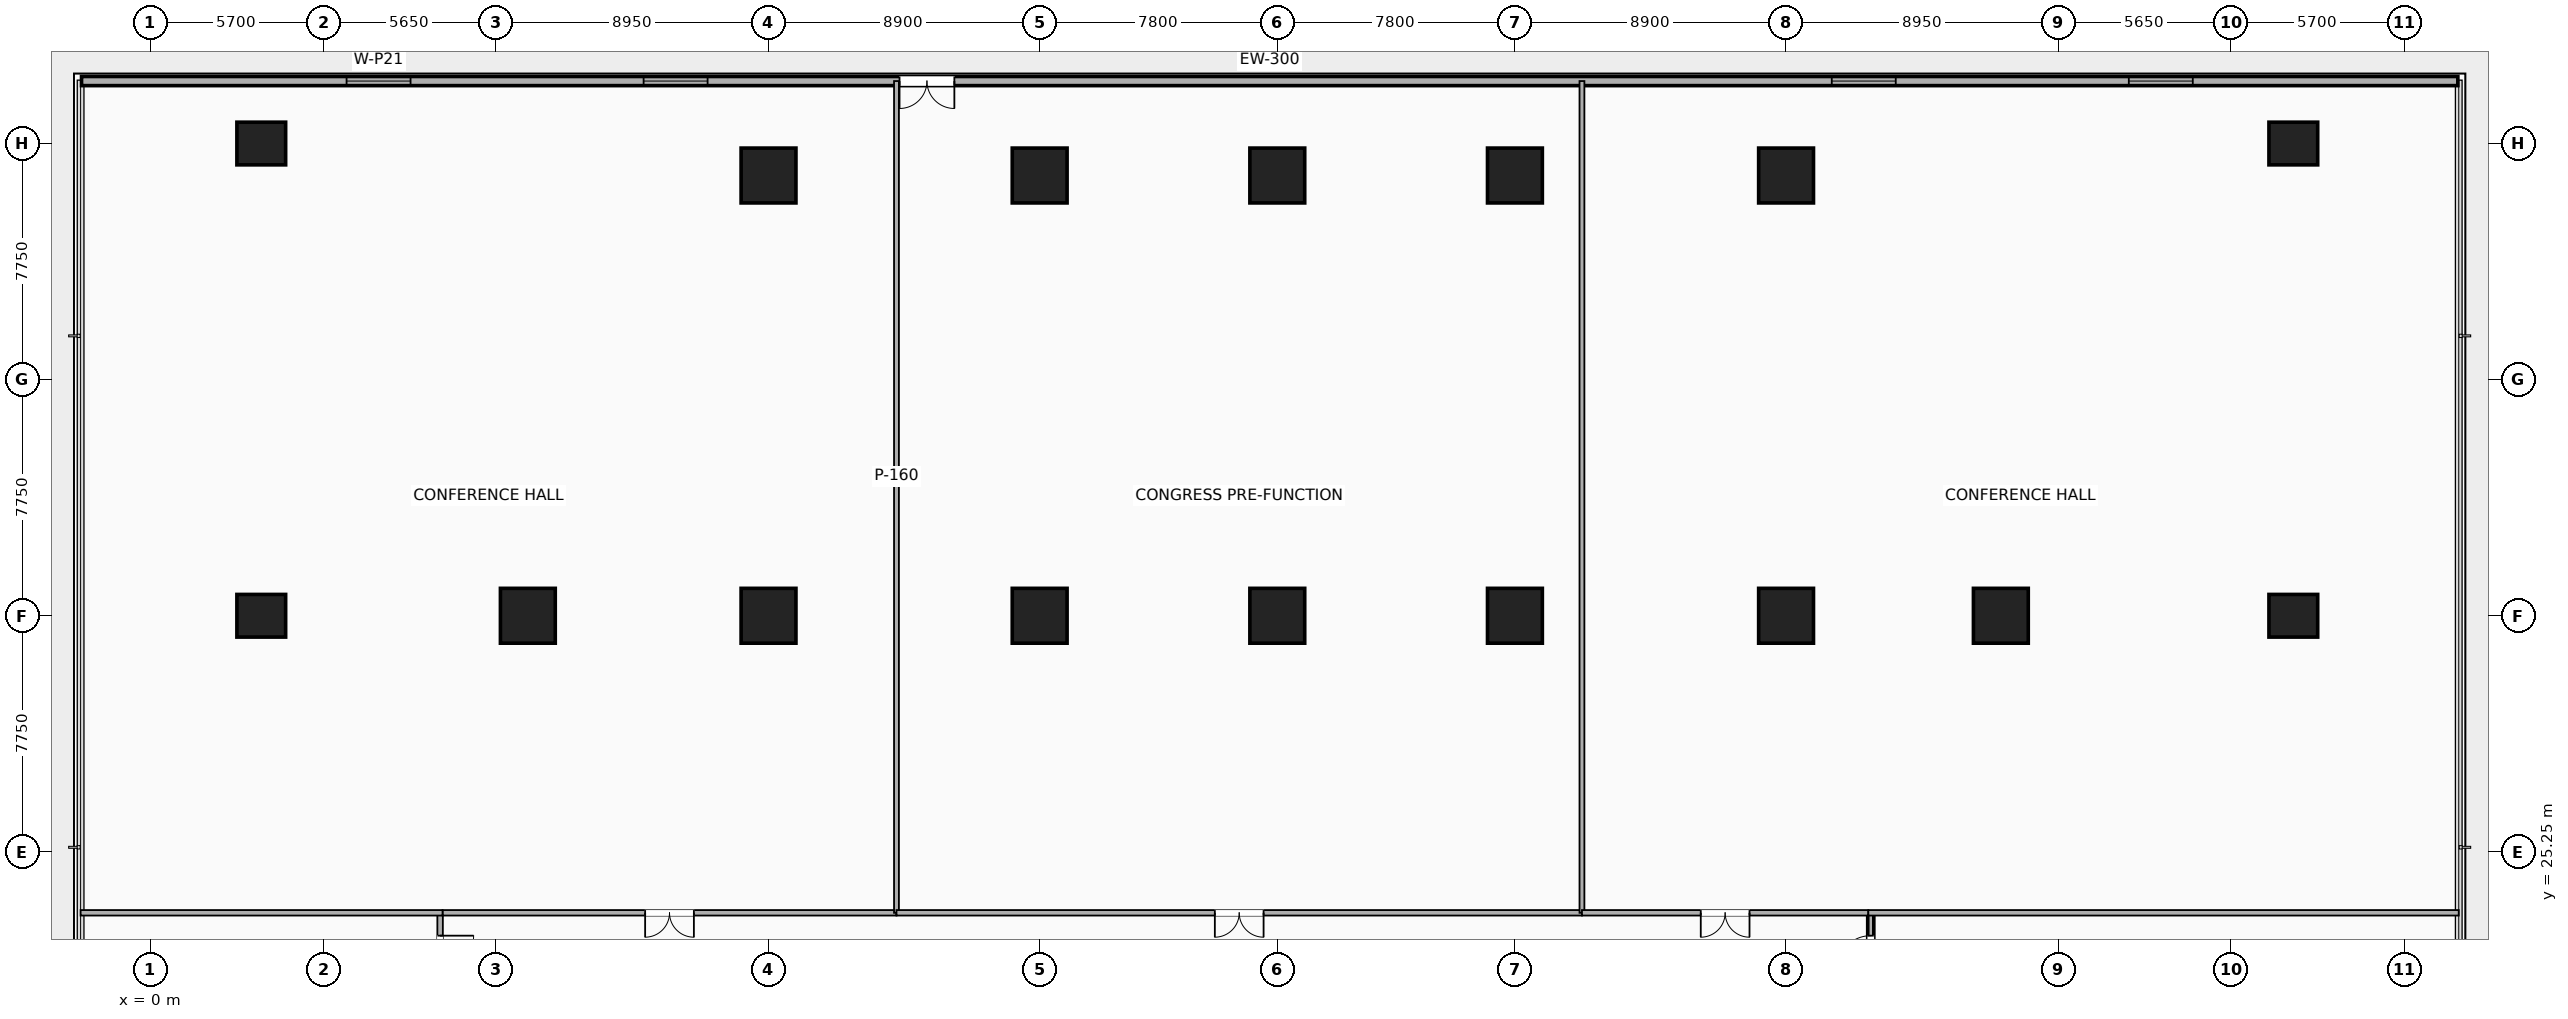
"""IFC4 building model, lengths in metres.
Left out: names, types, materials, properties, quantities, classifications, styles, units other than length and angle.
Written with IfcOpenShell. Run it as: python <this file> out.ifc"""

import sys

from ifc_helpers import new_model, si_unit, direction, frame, frame_2d, origin, origin_2d, place, context, subcontext, project, spatial, rectangle, extrude, element, fill, save


model = new_model("IFC4")
c1 = context("Model", 3, precision=1e-05, world=origin(), true_north=direction((0.0, 1.0)))
c2 = subcontext(c1, "Body", "Model", "MODEL_VIEW")
j1 = project(units=[si_unit("LENGTHUNIT", "METRE"), si_unit("PLANEANGLEUNIT", "RADIAN")], contexts=[c1])
p1 = place(None, origin())
s1 = spatial("IfcSite", under=j1, at=p1, CompositionType="ELEMENT")
p2 = place(p1, origin())
s2 = spatial("IfcBuilding", under=s1, at=p2, CompositionType="ELEMENT")
p3 = place(p2, frame((0.0, 0.0, 5.4)))
s3 = spatial("IfcBuildingStorey", under=s2, at=p3, CompositionType="ELEMENT", Elevation=5.4)
for number, where, z_axis, x_axis in (
    (1, (20.3, 33.0, -0.3), (0.0, 0.0, 1.0), (1.0, 0.0, 0.0)),
    (2, (29.2, 33.0, -0.3), (0.0, 0.0, 1.0), (1.0, 0.0, 0.0)),
    (3, (37.0, 33.0, -0.3), (0.0, 0.0, 1.0), (1.0, 0.0, 0.0)),
    (4, (44.8, 33.0, -0.3), (0.0, 0.0, 1.0), (1.0, 0.0, 0.0)),
    (5, (12.4, 33.0, -0.3), (0.0, 0.0, 1.0), (1.0, 0.0, 0.0)),
    (6, (20.3, 47.45, -0.3), (0.0, 0.0, 1.0), (1.0, 0.0, 0.0)),
    (7, (29.2, 47.45, -0.3), (0.0, 0.0, 1.0), (1.0, 0.0, 0.0)),
    (8, (37.0, 47.45, -0.3), (0.0, 0.0, 1.0), (1.0, 0.0, 0.0)),
    (9, (44.8, 47.45, -0.3), (0.0, 0.0, 1.0), (1.0, 0.0, 0.0)),
    (10, (53.7, 47.45, -0.3), (0.0, 0.0, 1.0), (1.0, 0.0, 0.0)),
    (11, (60.75, 33.0, -0.3), (0.0, 0.0, 1.0), (1.0, 0.0, 0.0)),
    (12, (53.7, 33.0, -0.3), (0.0, 0.0, 1.0), (1.0, 0.0, 0.0)),
):
    element("IfcColumn", number, at=place(p3, frame(where, z_axis=z_axis, x_axis=x_axis)), inside=s3, PredefinedType="COLUMN", context=c2, shape_type="SweptSolid", body=[
        extrude(rectangle(XDim=1.8, YDim=1.8, at=origin_2d()), origin(), (0.0, 0.0, 1.0), 4.6),
    ])
for number, where, z_axis, x_axis in (
    (13, (3.65, 33.0, -0.3), (0.0, 0.0, 1.0), (1.0, 0.0, 0.0)),
    (14, (3.65, 48.5, -0.3), (0.0, 0.0, 1.0), (1.0, 0.0, 0.0)),
    (15, (70.35, 33.0, -0.3), (0.0, 0.0, 1.0), (1.0, 0.0, 0.0)),
    (16, (70.35, 48.5, -0.3), (0.0, 0.0, 1.0), (1.0, 0.0, 0.0)),
):
    element("IfcColumn", number, at=place(p3, frame(where, z_axis=z_axis, x_axis=x_axis)), inside=s3, PredefinedType="COLUMN", context=c2, shape_type="SweptSolid", body=[
        extrude(rectangle(XDim=1.6, YDim=1.4, at=origin_2d()), origin(), (0.0, 0.0, 1.0), 4.6),
    ])
p4 = place(p3, frame((-2.25, 50.55, 0.0), z_axis=(0.0, 0.0, 1.0), x_axis=(1.0, 0.0, 0.0)))
e17 = element("IfcWall", 17, at=p4, inside=s3, PredefinedType="SOLIDWALL", context=c2, shape_type="SweptSolid", body=[
    extrude(rectangle(XDim=78.0, YDim=0.3, at=frame_2d((39.0, 0.0))), origin(), (0.0, 0.0, 1.0), 4.3),
])
p5 = place(p4, frame((26.85, 0.0, 0.0)))
e18 = element("IfcOpeningElement", 18, at=p5, cuts=e17, PredefinedType="OPENING", context=c2, shape_type="SweptSolid", body=[
    extrude(rectangle(XDim=1.8, YDim=2.15, at=frame_2d((0.9, 1.075))), frame((0.0, 0.16, 0.0), z_axis=(0.0, -1.0, 0.0), x_axis=(1.0, 0.0, 0.0)), (0.0, 0.0, 1.0), 0.32),
])
p6 = place(p4, frame((8.7, 0.0, 0.85)))
e19 = element("IfcOpeningElement", 19, at=p6, cuts=e17, PredefinedType="OPENING", context=c2, shape_type="SweptSolid", body=[
    extrude(rectangle(XDim=2.1, YDim=2.15, at=frame_2d((1.05, 1.075))), frame((0.0, 0.16, 0.0), z_axis=(0.0, -1.0, 0.0), x_axis=(1.0, 0.0, 0.0)), (0.0, 0.0, 1.0), 0.32),
])
p7 = place(p4, frame((18.45, 0.0, 0.85)))
e20 = element("IfcOpeningElement", 20, at=p7, cuts=e17, PredefinedType="OPENING", context=c2, shape_type="SweptSolid", body=[
    extrude(rectangle(XDim=2.1, YDim=2.15, at=frame_2d((1.05, 1.075))), frame((0.0, 0.16, 0.0), z_axis=(0.0, -1.0, 0.0), x_axis=(1.0, 0.0, 0.0)), (0.0, 0.0, 1.0), 0.32),
])
p8 = place(p4, frame((57.45, 0.0, 0.85)))
e21 = element("IfcOpeningElement", 21, at=p8, cuts=e17, PredefinedType="OPENING", context=c2, shape_type="SweptSolid", body=[
    extrude(rectangle(XDim=2.1, YDim=2.15, at=frame_2d((1.05, 1.075))), frame((0.0, 0.16, 0.0), z_axis=(0.0, -1.0, 0.0), x_axis=(1.0, 0.0, 0.0)), (0.0, 0.0, 1.0), 0.32),
])
p9 = place(p4, frame((67.2, 0.0, 0.85)))
e22 = element("IfcOpeningElement", 22, at=p9, cuts=e17, PredefinedType="OPENING", context=c2, shape_type="SweptSolid", body=[
    extrude(rectangle(XDim=2.1, YDim=2.15, at=frame_2d((1.05, 1.075))), frame((0.0, 0.16, 0.0), z_axis=(0.0, -1.0, 0.0), x_axis=(1.0, 0.0, 0.0)), (0.0, 0.0, 1.0), 0.32),
])
p10 = place(p3, frame((9.52, 0.22, 0.0), z_axis=(0.0, 0.0, 1.0), x_axis=(0.0, 1.0, 0.0)))
e23 = element("IfcWall", 23, at=p10, inside=s3, PredefinedType="PARTITIONING", context=c2, shape_type="SweptSolid", body=[
    extrude(rectangle(XDim=23.03, YDim=0.18, at=frame_2d((11.515, 0.0))), origin(), (0.0, 0.0, 1.0), 4.3),
])
p11 = place(p10, frame((21.18, 0.0, 0.0)))
e24 = element("IfcOpeningElement", 24, at=p11, cuts=e23, PredefinedType="OPENING", context=c2, shape_type="SweptSolid", body=[
    extrude(rectangle(XDim=1.1, YDim=2.15, at=frame_2d((0.55, 1.075))), frame((0.0, 0.1, 0.0), z_axis=(0.0, -1.0, 0.0), x_axis=(1.0, 0.0, 0.0)), (0.0, 0.0, 1.0), 0.2),
])
p12 = place(p3, frame((56.48, 0.22, 0.0), z_axis=(0.0, 0.0, 1.0), x_axis=(0.0, 1.0, 0.0)))
e25 = element("IfcWall", 25, at=p12, inside=s3, PredefinedType="PARTITIONING", context=c2, shape_type="SweptSolid", body=[
    extrude(rectangle(XDim=23.03, YDim=0.2, at=frame_2d((11.515, 0.0))), origin(), (0.0, 0.0, 1.0), 3.373),
])
p13 = place(p12, frame((22.28, 0.0, 0.0), z_axis=(0.0, 0.0, 1.0), x_axis=(-1.0, 0.0, 0.0)))
e26 = element("IfcOpeningElement", 26, at=p13, cuts=e25, PredefinedType="OPENING", context=c2, shape_type="SweptSolid", body=[
    extrude(rectangle(XDim=1.1, YDim=2.15, at=frame_2d((0.55, 1.075))), frame((0.0, 0.11, 0.0), z_axis=(0.0, -1.0, 0.0), x_axis=(1.0, 0.0, 0.0)), (0.0, 0.0, 1.0), 0.22),
])
p14 = place(p3, frame((9.6, 23.25, 0.0), z_axis=(0.0, 0.0, 1.0), x_axis=(1.0, 0.0, 0.0)))
e27 = element("IfcWall", 27, at=p14, inside=s3, PredefinedType="PARTITIONING", context=c2, shape_type="SweptSolid", body=[
    extrude(rectangle(XDim=14.9, YDim=0.18, at=frame_2d((7.45, 0.0))), origin(), (0.0, 0.0, 1.0), 3.43),
])
p15 = place(p14, frame((6.65, 0.0, 0.0)))
e28 = element("IfcOpeningElement", 28, at=p15, cuts=e27, PredefinedType="OPENING", context=c2, shape_type="SweptSolid", body=[
    extrude(rectangle(XDim=1.6, YDim=2.22, at=frame_2d((0.8, 1.11))), frame((0.0, 0.1, 0.0), z_axis=(0.0, -1.0, 0.0), x_axis=(1.0, 0.0, 0.0)), (0.0, 0.0, 1.0), 0.2),
])
p16 = place(p3, frame((-2.28, 23.25, 0.0), z_axis=(0.0, 0.0, 1.0), x_axis=(1.0, 0.0, 0.0)))
e29 = element("IfcWall", 29, at=p16, inside=s3, PredefinedType="PARTITIONING", context=c2, shape_type="SweptSolid", body=[
    extrude(rectangle(XDim=11.88, YDim=0.18, at=frame_2d((5.94, 0.0))), origin(), (0.0, 0.0, 1.0), 3.43),
])
p17 = place(p3, frame((24.5, 23.25, 0.0), z_axis=(0.0, 0.0, 1.0), x_axis=(0.0, 1.0, 0.0)))
e30 = element("IfcWall", 30, at=p17, inside=s3, PredefinedType="PARTITIONING", context=c2, shape_type="SweptSolid", body=[
    extrude(rectangle(XDim=27.3, YDim=0.16, at=frame_2d((13.65, 0.0))), origin(), (0.0, 0.0, 1.0), 3.373),
])
p18 = place(p3, frame((24.5, 23.25, 0.0), z_axis=(0.0, 0.0, 1.0), x_axis=(1.0, 0.0, 0.0)))
e31 = element("IfcWall", 31, at=p18, inside=s3, PredefinedType="PARTITIONING", context=c2, shape_type="SweptSolid", body=[
    extrude(rectangle(XDim=22.5, YDim=0.18, at=frame_2d((11.25, 0.0))), origin(), (0.0, 0.0, 1.0), 3.43),
])
p19 = place(p18, frame((10.45, 0.0, 0.0)))
e32 = element("IfcOpeningElement", 32, at=p19, cuts=e31, PredefinedType="OPENING", context=c2, shape_type="SweptSolid", body=[
    extrude(rectangle(XDim=1.6, YDim=2.22, at=frame_2d((0.8, 1.11))), frame((0.0, 0.1, 0.0), z_axis=(0.0, -1.0, 0.0), x_axis=(1.0, 0.0, 0.0)), (0.0, 0.0, 1.0), 0.2),
])
p20 = place(p3, frame((47.0, 23.25, 0.0), z_axis=(0.0, 0.0, 1.0), x_axis=(0.0, 1.0, 0.0)))
e33 = element("IfcWall", 33, at=p20, inside=s3, PredefinedType="PARTITIONING", context=c2, shape_type="SweptSolid", body=[
    extrude(rectangle(XDim=27.3, YDim=0.16, at=frame_2d((13.65, 0.0))), origin(), (0.0, 0.0, 1.0), 3.373),
])
p21 = place(p3, frame((47.0, 23.25, 0.0), z_axis=(0.0, 0.0, 1.0), x_axis=(1.0, 0.0, 0.0)))
e34 = element("IfcWall", 34, at=p21, inside=s3, PredefinedType="PARTITIONING", context=c2, shape_type="SweptSolid", body=[
    extrude(rectangle(XDim=9.4, YDim=0.18, at=frame_2d((4.7, 0.0))), origin(), (0.0, 0.0, 1.0), 3.982),
])
p22 = place(p21, frame((3.9, 0.0, 0.0)))
e35 = element("IfcOpeningElement", 35, at=p22, cuts=e34, PredefinedType="OPENING", context=c2, shape_type="SweptSolid", body=[
    extrude(rectangle(XDim=1.6, YDim=2.22, at=frame_2d((0.8, 1.11))), frame((0.0, 0.1, 0.0), z_axis=(0.0, -1.0, 0.0), x_axis=(1.0, 0.0, 0.0)), (0.0, 0.0, 1.0), 0.2),
])
p23 = place(p3, frame((56.4, 23.25, 0.0), z_axis=(0.0, 0.0, 1.0), x_axis=(1.0, 0.0, 0.0)))
e36 = element("IfcWall", 36, at=p23, inside=s3, PredefinedType="PARTITIONING", context=c2, shape_type="SweptSolid", body=[
    extrude(rectangle(XDim=19.38, YDim=0.18, at=frame_2d((9.69, 0.0))), origin(), (0.0, 0.0, 1.0), 3.43),
])
p24 = place(p5, origin())
e37 = element("IfcDoor", 37, at=p24, inside=s3, OperationType="DOUBLE_DOOR_SINGLE_SWING", PredefinedType="DOOR", context=c2, shape_type="SweptSolid", body=[
    extrude(rectangle(XDim=1.8, YDim=2.15, at=frame_2d((0.9, 1.075))), frame((0.0, 0.025, 0.0), z_axis=(0.0, -1.0, 0.0), x_axis=(1.0, 0.0, 0.0)), (0.0, 0.0, 1.0), 0.05),
])
fill(e18, e37)
p25 = place(p6, origin())
e38 = element("IfcWindow", 38, at=p25, inside=s3, PartitioningType="SINGLE_PANEL", PredefinedType="WINDOW", context=c2, shape_type="SweptSolid", body=[
    extrude(rectangle(XDim=2.1, YDim=2.15, at=frame_2d((1.05, 1.075))), frame((0.0, 0.03, 0.0), z_axis=(0.0, -1.0, 0.0), x_axis=(1.0, 0.0, 0.0)), (0.0, 0.0, 1.0), 0.06),
])
fill(e19, e38)
p26 = place(p7, origin())
e39 = element("IfcWindow", 39, at=p26, inside=s3, PartitioningType="SINGLE_PANEL", PredefinedType="WINDOW", context=c2, shape_type="SweptSolid", body=[
    extrude(rectangle(XDim=2.1, YDim=2.15, at=frame_2d((1.05, 1.075))), frame((0.0, 0.03, 0.0), z_axis=(0.0, -1.0, 0.0), x_axis=(1.0, 0.0, 0.0)), (0.0, 0.0, 1.0), 0.06),
])
fill(e20, e39)
p27 = place(p8, origin())
e40 = element("IfcWindow", 40, at=p27, inside=s3, PartitioningType="SINGLE_PANEL", PredefinedType="WINDOW", context=c2, shape_type="SweptSolid", body=[
    extrude(rectangle(XDim=2.1, YDim=2.15, at=frame_2d((1.05, 1.075))), frame((0.0, 0.03, 0.0), z_axis=(0.0, -1.0, 0.0), x_axis=(1.0, 0.0, 0.0)), (0.0, 0.0, 1.0), 0.06),
])
fill(e21, e40)
p28 = place(p9, origin())
e41 = element("IfcWindow", 41, at=p28, inside=s3, PartitioningType="SINGLE_PANEL", PredefinedType="WINDOW", context=c2, shape_type="SweptSolid", body=[
    extrude(rectangle(XDim=2.1, YDim=2.15, at=frame_2d((1.05, 1.075))), frame((0.0, 0.03, 0.0), z_axis=(0.0, -1.0, 0.0), x_axis=(1.0, 0.0, 0.0)), (0.0, 0.0, 1.0), 0.06),
])
fill(e22, e41)
p29 = place(p11, origin())
e42 = element("IfcDoor", 42, at=p29, inside=s3, OperationType="SINGLE_SWING_RIGHT", PredefinedType="DOOR", context=c2, shape_type="SweptSolid", body=[
    extrude(rectangle(XDim=1.1, YDim=2.15, at=frame_2d((0.55, 1.075))), frame((0.0, 0.025, 0.0), z_axis=(0.0, -1.0, 0.0), x_axis=(1.0, 0.0, 0.0)), (0.0, 0.0, 1.0), 0.05),
])
fill(e24, e42)
p30 = place(p13, origin())
e43 = element("IfcDoor", 43, at=p30, inside=s3, OperationType="SINGLE_SWING_LEFT", PredefinedType="DOOR", context=c2, shape_type="SweptSolid", body=[
    extrude(rectangle(XDim=1.1, YDim=2.15, at=frame_2d((0.55, 1.075))), frame((0.0, 0.025, 0.0), z_axis=(0.0, -1.0, 0.0), x_axis=(1.0, 0.0, 0.0)), (0.0, 0.0, 1.0), 0.05),
])
fill(e26, e43)
p31 = place(p15, origin())
e44 = element("IfcDoor", 44, at=p31, inside=s3, OperationType="DOUBLE_DOOR_SINGLE_SWING", PredefinedType="DOOR", context=c2, shape_type="SweptSolid", body=[
    extrude(rectangle(XDim=1.6, YDim=2.22, at=frame_2d((0.8, 1.11))), frame((0.0, 0.025, 0.0), z_axis=(0.0, -1.0, 0.0), x_axis=(1.0, 0.0, 0.0)), (0.0, 0.0, 1.0), 0.05),
])
fill(e28, e44)
p32 = place(p19, origin())
e45 = element("IfcDoor", 45, at=p32, inside=s3, OperationType="DOUBLE_DOOR_SINGLE_SWING", PredefinedType="DOOR", context=c2, shape_type="SweptSolid", body=[
    extrude(rectangle(XDim=1.6, YDim=2.22, at=frame_2d((0.8, 1.11))), frame((0.0, 0.025, 0.0), z_axis=(0.0, -1.0, 0.0), x_axis=(1.0, 0.0, 0.0)), (0.0, 0.0, 1.0), 0.05),
])
fill(e32, e45)
p33 = place(p22, origin())
e46 = element("IfcDoor", 46, at=p33, inside=s3, OperationType="DOUBLE_DOOR_SINGLE_SWING", PredefinedType="DOOR", context=c2, shape_type="SweptSolid", body=[
    extrude(rectangle(XDim=1.6, YDim=2.22, at=frame_2d((0.8, 1.11))), frame((0.0, 0.025, 0.0), z_axis=(0.0, -1.0, 0.0), x_axis=(1.0, 0.0, 0.0)), (0.0, 0.0, 1.0), 0.05),
])
fill(e35, e46)
save(model, sys.argv[1])
